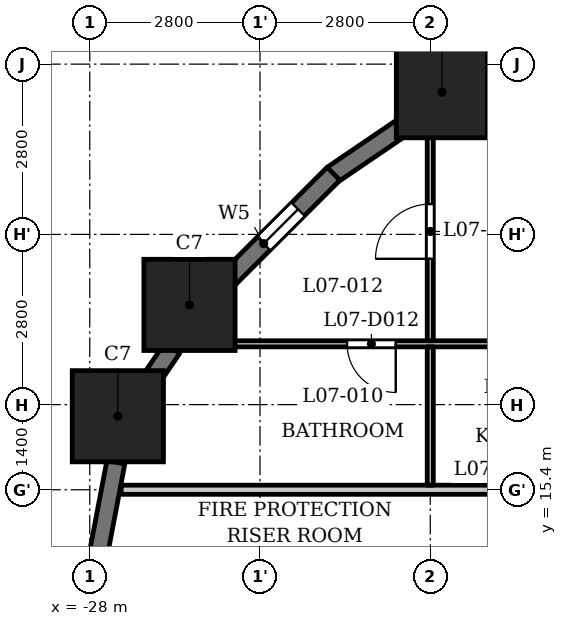
"""IFC4 building model, lengths in metres.
Left out: names, types, materials, properties, quantities, classifications, styles, units other than length and angle.
Written with IfcOpenShell. Run it as: python <this file> out.ifc"""

import sys

from ifc_helpers import new_model, si_unit, direction, frame, frame_2d, origin, origin_2d, place, context, subcontext, project, spatial, rectangle, extrude, element, fill, save


model = new_model("IFC4")
c1 = context("Model", 3, precision=1e-05, world=origin(), true_north=direction((0.0, 1.0)))
c2 = subcontext(c1, "Body", "Model", "MODEL_VIEW")
j1 = project(units=[si_unit("LENGTHUNIT", "METRE"), si_unit("PLANEANGLEUNIT", "RADIAN")], contexts=[c1])
p1 = place(None, origin())
s1 = spatial("IfcSite", under=j1, at=p1, CompositionType="ELEMENT")
p2 = place(p1, origin())
s2 = spatial("IfcBuilding", under=s1, at=p2, CompositionType="ELEMENT")
p3 = place(p2, frame((0.0, 0.0, 34.0)))
s3 = spatial("IfcBuildingStorey", under=s2, at=p3, CompositionType="ELEMENT", Elevation=34.0)
for number, where, z_axis, x_axis in (
    (1, (-22.209, 21.938, 0.0), (0.0, 0.0, 1.0), (1.0, 0.0, 0.0)),
    (2, (-26.36, 18.44, 0.0), (0.0, 0.0, 1.0), (1.0, 0.0, 0.0)),
    (3, (-27.538, 16.609, 0.0), (0.0, 0.0, 1.0), (1.0, 0.0, 0.0)),
):
    element("IfcColumn", number, at=place(p3, frame(where, z_axis=z_axis, x_axis=x_axis)), inside=s3, PredefinedType="COLUMN", context=c2, shape_type="SweptSolid", body=[
        extrude(rectangle(XDim=1.5, YDim=1.5, at=origin_2d()), origin(), (0.0, 0.0, 1.0), 3.5),
    ])
for number, where, z_axis, x_axis in (
    (4, (-19.972, 22.253, 0.0), (0.0, 0.0, 1.0), (-0.982, -0.187, 0.0)),
    (5, (-22.767, 21.426, 0.0), (0.0, 0.0, 1.0), (-0.827, -0.562, 0.0)),
):
    element("IfcWall", number, at=place(p3, frame(where, z_axis=z_axis, x_axis=x_axis)), inside=s3, PredefinedType="SOLIDWALL", context=c2, shape_type="SweptSolid", body=[
        extrude(rectangle(XDim=1.506, YDim=0.3, at=frame_2d((0.753, 0.0))), origin(), (0.0, 0.0, 1.0), 2.35),
    ])
p4 = place(p3, frame((-23.991, 20.597, 0.0), z_axis=(0.0, 0.0, 1.0), x_axis=(-0.707106781187, -0.707106781187, 0.0)))
e6 = element("IfcWall", 6, at=p4, inside=s3, PredefinedType="SOLIDWALL", context=c2, shape_type="SweptSolid", body=[
    extrude(rectangle(XDim=2.45, YDim=0.3, at=frame_2d((1.225, 0.0))), origin(), (0.0, 0.0, 1.0), 2.35),
])
p5 = place(p4, frame((0.825, 0.0, 0.6)))
e7 = element("IfcOpeningElement", 7, at=p5, cuts=e6, PredefinedType="OPENING", context=c2, shape_type="SweptSolid", body=[
    extrude(rectangle(XDim=0.8, YDim=1.55, at=frame_2d((0.4, 0.775))), frame((0.0, 0.16, 0.0), z_axis=(0.0, -1.0, 0.0), x_axis=(1.0, 0.0, 0.0)), (0.0, 0.0, 1.0), 0.32),
])
p6 = place(p3, frame((-26.645, 17.727, 0.0), z_axis=(0.0, 0.0, 1.0), x_axis=(-0.562083182981, -0.827080706709, 0.0)))
e8 = element("IfcWall", 8, at=p6, inside=s3, PredefinedType="SOLIDWALL", context=c2, shape_type="SweptSolid", body=[
    extrude(rectangle(XDim=0.677, YDim=0.3, at=frame_2d((0.339, 0.0))), origin(), (0.0, 0.0, 1.0), 3.2),
])
p7 = place(p3, frame((-27.571, 15.851, 0.0), z_axis=(0.0, 0.0, 1.0), x_axis=(-0.187223837635, -0.982317277982, 0.0)))
e9 = element("IfcWall", 9, at=p7, inside=s3, PredefinedType="SOLIDWALL", context=c2, shape_type="SweptSolid", body=[
    extrude(rectangle(XDim=1.506, YDim=0.3, at=frame_2d((0.753, 0.0))), origin(), (0.0, 0.0, 1.0), 2.35),
])
p8 = place(p3, frame((-27.484, 15.4, 0.0), z_axis=(0.0, 0.0, 1.0), x_axis=(1.0, 0.0, 0.0)))
e10 = element("IfcWall", 10, at=p8, inside=s3, PredefinedType="PARTITIONING", context=c2, shape_type="SweptSolid", body=[
    extrude(rectangle(XDim=54.968, YDim=0.15, at=frame_2d((27.484, 0.0))), origin(), (0.0, 0.0, 1.0), 3.2),
])
p9 = place(p8, frame((8.784, 0.0, 0.0)))
e11 = element("IfcOpeningElement", 11, at=p9, cuts=e10, PredefinedType="OPENING", context=c2, shape_type="SweptSolid", body=[
    extrude(rectangle(XDim=1.0, YDim=2.1, at=frame_2d((0.5, 1.05))), frame((0.0, 0.085, 0.0), z_axis=(0.0, -1.0, 0.0), x_axis=(1.0, 0.0, 0.0)), (0.0, 0.0, 1.0), 0.17),
])
p10 = place(p8, frame((14.634, 0.0, 0.0)))
e12 = element("IfcOpeningElement", 12, at=p10, cuts=e10, PredefinedType="OPENING", context=c2, shape_type="SweptSolid", body=[
    extrude(rectangle(XDim=1.0, YDim=2.1, at=frame_2d((0.5, 1.05))), frame((0.0, 0.085, 0.0), z_axis=(0.0, -1.0, 0.0), x_axis=(1.0, 0.0, 0.0)), (0.0, 0.0, 1.0), 0.17),
])
p11 = place(p8, frame((23.834, 0.0, 0.0)))
e13 = element("IfcOpeningElement", 13, at=p11, cuts=e10, PredefinedType="OPENING", context=c2, shape_type="SweptSolid", body=[
    extrude(rectangle(XDim=1.0, YDim=2.1, at=frame_2d((0.5, 1.05))), frame((0.0, 0.085, 0.0), z_axis=(0.0, -1.0, 0.0), x_axis=(1.0, 0.0, 0.0)), (0.0, 0.0, 1.0), 0.17),
])
p12 = place(p8, frame((28.184, 0.0, 0.0)))
e14 = element("IfcOpeningElement", 14, at=p12, cuts=e10, PredefinedType="OPENING", context=c2, shape_type="SweptSolid", body=[
    extrude(rectangle(XDim=1.0, YDim=2.1, at=frame_2d((0.5, 1.05))), frame((0.0, 0.085, 0.0), z_axis=(0.0, -1.0, 0.0), x_axis=(1.0, 0.0, 0.0)), (0.0, 0.0, 1.0), 0.17),
])
p13 = place(p8, frame((41.884, 0.0, 0.0)))
e15 = element("IfcOpeningElement", 15, at=p13, cuts=e10, PredefinedType="OPENING", context=c2, shape_type="SweptSolid", body=[
    extrude(rectangle(XDim=1.0, YDim=2.1, at=frame_2d((0.5, 1.05))), frame((0.0, 0.085, 0.0), z_axis=(0.0, -1.0, 0.0), x_axis=(1.0, 0.0, 0.0)), (0.0, 0.0, 1.0), 0.17),
])
p14 = place(p8, frame((48.234, 0.0, 0.0)))
e16 = element("IfcOpeningElement", 16, at=p14, cuts=e10, PredefinedType="OPENING", context=c2, shape_type="SweptSolid", body=[
    extrude(rectangle(XDim=1.0, YDim=2.1, at=frame_2d((0.5, 1.05))), frame((0.0, 0.085, 0.0), z_axis=(0.0, -1.0, 0.0), x_axis=(1.0, 0.0, 0.0)), (0.0, 0.0, 1.0), 0.17),
])
p15 = place(p3, frame((-26.732, 17.8, 0.0), z_axis=(0.0, 0.0, 1.0), x_axis=(1.0, 0.0, 0.0)))
e17 = element("IfcWall", 17, at=p15, inside=s3, PredefinedType="PARTITIONING", context=c2, shape_type="SweptSolid", body=[
    extrude(rectangle(XDim=53.126, YDim=0.1, at=frame_2d((26.563, 0.0))), origin(), (0.0, 0.0, 1.0), 3.2),
])
p16 = place(p15, frame((2.964, 0.0, 0.0)))
e18 = element("IfcOpeningElement", 18, at=p16, cuts=e17, PredefinedType="OPENING", context=c2, shape_type="SweptSolid", body=[
    extrude(rectangle(XDim=0.8, YDim=2.1, at=frame_2d((0.4, 1.05))), frame((0.0, 0.06, 0.0), z_axis=(0.0, -1.0, 0.0), x_axis=(1.0, 0.0, 0.0)), (0.0, 0.0, 1.0), 0.12),
])
p17 = place(p15, frame((7.132, 0.0, 0.0)))
e19 = element("IfcOpeningElement", 19, at=p17, cuts=e17, PredefinedType="OPENING", context=c2, shape_type="SweptSolid", body=[
    extrude(rectangle(XDim=0.9, YDim=2.1, at=frame_2d((0.45, 1.05))), frame((0.0, 0.06, 0.0), z_axis=(0.0, -1.0, 0.0), x_axis=(1.0, 0.0, 0.0)), (0.0, 0.0, 1.0), 0.12),
])
p18 = place(p15, frame((19.432, 0.0, 0.0)))
e20 = element("IfcOpeningElement", 20, at=p18, cuts=e17, PredefinedType="OPENING", context=c2, shape_type="SweptSolid", body=[
    extrude(rectangle(XDim=0.8, YDim=2.1, at=frame_2d((0.4, 1.05))), frame((0.0, 0.06, 0.0), z_axis=(0.0, -1.0, 0.0), x_axis=(1.0, 0.0, 0.0)), (0.0, 0.0, 1.0), 0.12),
])
p19 = place(p15, frame((16.732, 0.0, 0.0)))
e21 = element("IfcOpeningElement", 21, at=p19, cuts=e17, PredefinedType="OPENING", context=c2, shape_type="SweptSolid", body=[
    extrude(rectangle(XDim=0.9, YDim=2.1, at=frame_2d((0.45, 1.05))), frame((0.0, 0.06, 0.0), z_axis=(0.0, -1.0, 0.0), x_axis=(1.0, 0.0, 0.0)), (0.0, 0.0, 1.0), 0.12),
])
p20 = place(p15, frame((10.982, 0.0, 0.0)))
e22 = element("IfcOpeningElement", 22, at=p20, cuts=e17, PredefinedType="OPENING", context=c2, shape_type="SweptSolid", body=[
    extrude(rectangle(XDim=0.9, YDim=2.1, at=frame_2d((0.45, 1.05))), frame((0.0, 0.06, 0.0), z_axis=(0.0, -1.0, 0.0), x_axis=(1.0, 0.0, 0.0)), (0.0, 0.0, 1.0), 0.12),
])
p21 = place(p15, frame((12.982, 0.0, 0.0)))
e23 = element("IfcOpeningElement", 23, at=p21, cuts=e17, PredefinedType="OPENING", context=c2, shape_type="SweptSolid", body=[
    extrude(rectangle(XDim=0.9, YDim=2.1, at=frame_2d((0.45, 1.05))), frame((0.0, 0.06, 0.0), z_axis=(0.0, -1.0, 0.0), x_axis=(1.0, 0.0, 0.0)), (0.0, 0.0, 1.0), 0.12),
])
p22 = place(p15, frame((25.382, 0.0, 0.0)))
e24 = element("IfcOpeningElement", 24, at=p22, cuts=e17, PredefinedType="OPENING", context=c2, shape_type="SweptSolid", body=[
    extrude(rectangle(XDim=0.8, YDim=2.1, at=frame_2d((0.4, 1.05))), frame((0.0, 0.06, 0.0), z_axis=(0.0, -1.0, 0.0), x_axis=(1.0, 0.0, 0.0)), (0.0, 0.0, 1.0), 0.12),
])
p23 = place(p15, frame((22.182, 0.0, 0.0)))
e25 = element("IfcOpeningElement", 25, at=p23, cuts=e17, PredefinedType="OPENING", context=c2, shape_type="SweptSolid", body=[
    extrude(rectangle(XDim=0.9, YDim=2.1, at=frame_2d((0.45, 1.05))), frame((0.0, 0.06, 0.0), z_axis=(0.0, -1.0, 0.0), x_axis=(1.0, 0.0, 0.0)), (0.0, 0.0, 1.0), 0.12),
])
p24 = place(p15, frame((36.232, 0.0, 0.0)))
e26 = element("IfcOpeningElement", 26, at=p24, cuts=e17, PredefinedType="OPENING", context=c2, shape_type="SweptSolid", body=[
    extrude(rectangle(XDim=0.8, YDim=2.1, at=frame_2d((0.4, 1.05))), frame((0.0, 0.06, 0.0), z_axis=(0.0, -1.0, 0.0), x_axis=(1.0, 0.0, 0.0)), (0.0, 0.0, 1.0), 0.12),
])
p25 = place(p15, frame((33.782, 0.0, 0.0)))
e27 = element("IfcOpeningElement", 27, at=p25, cuts=e17, PredefinedType="OPENING", context=c2, shape_type="SweptSolid", body=[
    extrude(rectangle(XDim=0.9, YDim=2.1, at=frame_2d((0.45, 1.05))), frame((0.0, 0.06, 0.0), z_axis=(0.0, -1.0, 0.0), x_axis=(1.0, 0.0, 0.0)), (0.0, 0.0, 1.0), 0.12),
])
p26 = place(p15, frame((27.282, 0.0, 0.0)))
e28 = element("IfcOpeningElement", 28, at=p26, cuts=e17, PredefinedType="OPENING", context=c2, shape_type="SweptSolid", body=[
    extrude(rectangle(XDim=0.9, YDim=2.1, at=frame_2d((0.45, 1.05))), frame((0.0, 0.06, 0.0), z_axis=(0.0, -1.0, 0.0), x_axis=(1.0, 0.0, 0.0)), (0.0, 0.0, 1.0), 0.12),
])
p27 = place(p15, frame((30.282, 0.0, 0.0)))
e29 = element("IfcOpeningElement", 29, at=p27, cuts=e17, PredefinedType="OPENING", context=c2, shape_type="SweptSolid", body=[
    extrude(rectangle(XDim=0.9, YDim=2.1, at=frame_2d((0.45, 1.05))), frame((0.0, 0.06, 0.0), z_axis=(0.0, -1.0, 0.0), x_axis=(1.0, 0.0, 0.0)), (0.0, 0.0, 1.0), 0.12),
])
p28 = place(p15, frame((38.582, 0.0, 0.0)))
e30 = element("IfcOpeningElement", 30, at=p28, cuts=e17, PredefinedType="OPENING", context=c2, shape_type="SweptSolid", body=[
    extrude(rectangle(XDim=0.8, YDim=2.1, at=frame_2d((0.4, 1.05))), frame((0.0, 0.06, 0.0), z_axis=(0.0, -1.0, 0.0), x_axis=(1.0, 0.0, 0.0)), (0.0, 0.0, 1.0), 0.12),
])
p29 = place(p15, frame((41.232, 0.0, 0.0)))
e31 = element("IfcOpeningElement", 31, at=p29, cuts=e17, PredefinedType="OPENING", context=c2, shape_type="SweptSolid", body=[
    extrude(rectangle(XDim=0.9, YDim=2.1, at=frame_2d((0.45, 1.05))), frame((0.0, 0.06, 0.0), z_axis=(0.0, -1.0, 0.0), x_axis=(1.0, 0.0, 0.0)), (0.0, 0.0, 1.0), 0.12),
])
p30 = place(p15, frame((51.532, 0.0, 0.0)))
e32 = element("IfcOpeningElement", 32, at=p30, cuts=e17, PredefinedType="OPENING", context=c2, shape_type="SweptSolid", body=[
    extrude(rectangle(XDim=0.8, YDim=2.1, at=frame_2d((0.4, 1.05))), frame((0.0, 0.06, 0.0), z_axis=(0.0, -1.0, 0.0), x_axis=(1.0, 0.0, 0.0)), (0.0, 0.0, 1.0), 0.12),
])
p31 = place(p15, frame((46.582, 0.0, 0.0)))
e33 = element("IfcOpeningElement", 33, at=p31, cuts=e17, PredefinedType="OPENING", context=c2, shape_type="SweptSolid", body=[
    extrude(rectangle(XDim=0.9, YDim=2.1, at=frame_2d((0.45, 1.05))), frame((0.0, 0.06, 0.0), z_axis=(0.0, -1.0, 0.0), x_axis=(1.0, 0.0, 0.0)), (0.0, 0.0, 1.0), 0.12),
])
p32 = place(p3, frame((-22.4, 15.475, 0.0), z_axis=(0.0, 0.0, 1.0), x_axis=(0.0, 1.0, 0.0)))
e34 = element("IfcWall", 34, at=p32, inside=s3, PredefinedType="PARTITIONING", context=c2, shape_type="SweptSolid", body=[
    extrude(rectangle(XDim=2.275, YDim=0.1, at=frame_2d((1.137, 0.0))), origin(), (0.0, 0.0, 1.0), 3.2),
])
p33 = place(p3, frame((-22.4, 17.85, 0.0), z_axis=(0.0, 0.0, 1.0), x_axis=(0.0, 1.0, 0.0)))
e35 = element("IfcWall", 35, at=p33, inside=s3, PredefinedType="PARTITIONING", context=c2, shape_type="SweptSolid", body=[
    extrude(rectangle(XDim=3.87, YDim=0.1, at=frame_2d((1.935, 0.0))), origin(), (0.0, 0.0, 1.0), 3.2),
])
p34 = place(p33, frame((1.348, 0.0, 0.0)))
e36 = element("IfcOpeningElement", 36, at=p34, cuts=e35, PredefinedType="OPENING", context=c2, shape_type="SweptSolid", body=[
    extrude(rectangle(XDim=0.9, YDim=2.1, at=frame_2d((0.45, 1.05))), frame((0.0, 0.06, 0.0), z_axis=(0.0, -1.0, 0.0), x_axis=(1.0, 0.0, 0.0)), (0.0, 0.0, 1.0), 0.12),
])
p35 = place(p16, origin())
e37 = element("IfcDoor", 37, at=p35, inside=s3, OperationType="SINGLE_SWING_RIGHT", PredefinedType="DOOR", context=c2, shape_type="SweptSolid", body=[
    extrude(rectangle(XDim=0.8, YDim=2.1, at=frame_2d((0.4, 1.05))), frame((0.0, 0.025, 0.0), z_axis=(0.0, -1.0, 0.0), x_axis=(1.0, 0.0, 0.0)), (0.0, 0.0, 1.0), 0.05),
])
fill(e18, e37)
p36 = place(p34, origin())
e38 = element("IfcDoor", 38, at=p36, inside=s3, OperationType="SINGLE_SWING_RIGHT", PredefinedType="DOOR", context=c2, shape_type="SweptSolid", body=[
    extrude(rectangle(XDim=0.9, YDim=2.1, at=frame_2d((0.45, 1.05))), frame((0.0, 0.025, 0.0), z_axis=(0.0, -1.0, 0.0), x_axis=(1.0, 0.0, 0.0)), (0.0, 0.0, 1.0), 0.05),
])
fill(e36, e38)
p37 = place(p5, origin())
e39 = element("IfcWindow", 39, at=p37, inside=s3, PartitioningType="SINGLE_PANEL", PredefinedType="WINDOW", context=c2, shape_type="SweptSolid", body=[
    extrude(rectangle(XDim=0.8, YDim=1.55, at=frame_2d((0.4, 0.775))), frame((0.0, 0.03, 0.0), z_axis=(0.0, -1.0, 0.0), x_axis=(1.0, 0.0, 0.0)), (0.0, 0.0, 1.0), 0.06),
])
fill(e7, e39)
save(model, sys.argv[1])
